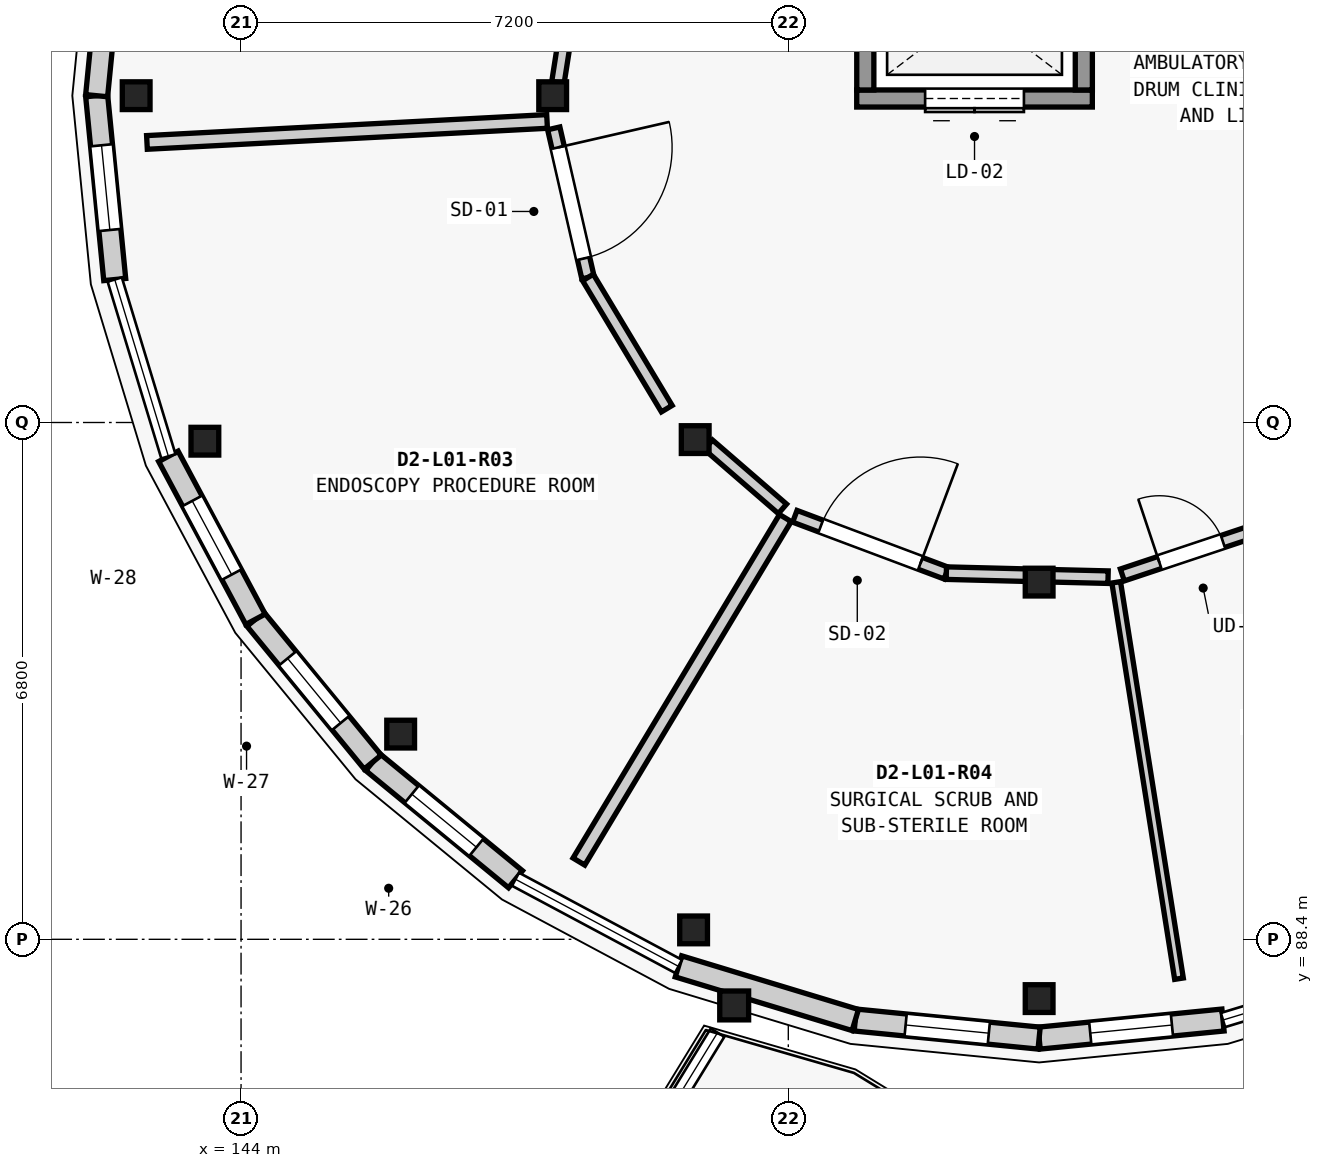
"""IFC4 building model, lengths in metres.
Left out: names, types, materials, properties, quantities, classifications, styles, units other than length and angle.
Written with IfcOpenShell. Run it as: python <this file> out.ifc"""

import sys

from ifc_helpers import new_model, si_unit, direction, frame, frame_2d, origin, origin_2d, place, context, subcontext, project, spatial, rectangle, circle, extrude, element, fill, save


model = new_model("IFC4")
c1 = context("Model", 3, precision=1e-05, world=origin(), true_north=direction((0.0, 1.0)))
c2 = subcontext(c1, "Body", "Model", "MODEL_VIEW")
j1 = project(units=[si_unit("LENGTHUNIT", "METRE"), si_unit("PLANEANGLEUNIT", "RADIAN")], contexts=[c1])
p1 = place(None, origin())
s1 = spatial("IfcSite", under=j1, at=p1, CompositionType="ELEMENT")
p2 = place(p1, origin())
s2 = spatial("IfcBuilding", under=s1, at=p2, CompositionType="ELEMENT")
p3 = place(p2, frame((0.0, 0.0, 4.55)))
s3 = spatial("IfcBuildingStorey", under=s2, at=p3, CompositionType="ELEMENT", Elevation=4.55)
for number, where, z_axis, x_axis in (
    (1, (142.62, 99.5, 0.0), (0.0, 0.0, 1.0), (1.0, 0.0, 0.0)),
    (2, (143.524, 94.954, 0.0), (0.0, 0.0, 1.0), (1.0, 0.0, 0.0)),
    (3, (146.1, 91.1, 0.0), (0.0, 0.0, 1.0), (1.0, 0.0, 0.0)),
    (4, (149.954, 88.524, 0.0), (0.0, 0.0, 1.0), (1.0, 0.0, 0.0)),
    (5, (154.5, 87.62, 0.0), (0.0, 0.0, 1.0), (1.0, 0.0, 0.0)),
    (6, (148.1, 99.5, 0.0), (0.0, 0.0, 1.0), (1.0, 0.0, 0.0)),
    (7, (149.975, 94.975, 0.0), (0.0, 0.0, 1.0), (1.0, 0.0, 0.0)),
    (8, (154.5, 93.1, 0.0), (0.0, 0.0, 1.0), (1.0, 0.0, 0.0)),
):
    element("IfcColumn", number, at=place(p3, frame(where, z_axis=z_axis, x_axis=x_axis)), inside=s3, PredefinedType="COLUMN", context=c2, shape_type="SweptSolid", body=[
        extrude(rectangle(XDim=0.365, YDim=0.365, at=origin_2d()), origin(), (0.0, 0.0, 1.0), 4.2),
    ])
p4 = place(p3, frame((150.488, 87.53, 0.0), z_axis=(0.0, 0.0, 1.0), x_axis=(1.0, 0.0, 0.0)))
e9 = element("IfcColumn", 9, at=p4, inside=s3, PredefinedType="PILASTER", context=c2, shape_type="SweptSolid", body=[
    extrude(circle(Radius=0.19, at=origin_2d()), origin(), (0.0, 0.0, 1.0), 4.2),
])
p5 = place(p3, frame((156.919, 87.338, 0.0), z_axis=(0.0, 0.0, 1.0), x_axis=(-0.995202863323, -0.097832820839, 0.0)))
e10 = element("IfcWall", 10, at=p5, inside=s3, PredefinedType="ELEMENTEDWALL", context=c2, shape_type="SweptSolid", body=[
    extrude(rectangle(XDim=2.431, YDim=0.29, at=frame_2d((1.215, 0.0))), origin(), (0.0, 0.0, 1.0), 3.309),
])
p6 = place(p5, frame((0.675, 0.0, 0.85)))
e11 = element("IfcOpeningElement", 11, at=p6, cuts=e10, PredefinedType="OPENING", context=c2, shape_type="SweptSolid", body=[
    extrude(rectangle(XDim=1.08, YDim=1.8, at=frame_2d((0.54, 0.9))), frame((0.0, 0.155, 0.0), z_axis=(0.0, -1.0, 0.0), x_axis=(1.0, 0.0, 0.0)), (0.0, 0.0, 1.0), 0.31),
])
p7 = place(p3, frame((154.5, 87.1, 0.0), z_axis=(0.0, 0.0, 1.0), x_axis=(-0.995202863323, 0.097832820839, 0.0)))
e12 = element("IfcWall", 12, at=p7, inside=s3, PredefinedType="ELEMENTEDWALL", context=c2, shape_type="SweptSolid", body=[
    extrude(rectangle(XDim=2.431, YDim=0.29, at=frame_2d((1.215, 0.0))), origin(), (0.0, 0.0, 1.0), 3.309),
])
p8 = place(p7, frame((0.665, 0.0, 0.85)))
e13 = element("IfcOpeningElement", 13, at=p8, cuts=e12, PredefinedType="OPENING", context=c2, shape_type="SweptSolid", body=[
    extrude(rectangle(XDim=1.1, YDim=1.25, at=frame_2d((0.55, 0.625))), frame((0.0, 0.155, 0.0), z_axis=(0.0, -1.0, 0.0), x_axis=(1.0, 0.0, 0.0)), (0.0, 0.0, 1.0), 0.31),
])
p9 = place(p3, frame((152.081, 87.338, 0.0), z_axis=(0.0, 0.0, 1.0), x_axis=(-0.956892539407, 0.290442193951, 0.0)))
e14 = element("IfcWall", 14, at=p9, inside=s3, PredefinedType="ELEMENTEDWALL", context=c2, shape_type="SweptSolid", body=[
    extrude(rectangle(XDim=2.431, YDim=0.29, at=frame_2d((1.215, 0.0))), origin(), (0.0, 0.0, 1.0), 3.309),
])
p10 = place(p3, frame((147.611, 89.19, 0.0), z_axis=(0.0, 0.0, 1.0), x_axis=(-0.773048113134, 0.634347392822, 0.0)))
e15 = element("IfcWall", 15, at=p10, inside=s3, PredefinedType="ELEMENTEDWALL", context=c2, shape_type="SweptSolid", body=[
    extrude(rectangle(XDim=2.431, YDim=0.29, at=frame_2d((1.215, 0.0))), origin(), (0.0, 0.0, 1.0), 3.309),
])
p11 = place(p10, frame((0.665, 0.0, 0.85)))
e16 = element("IfcOpeningElement", 16, at=p11, cuts=e15, PredefinedType="OPENING", context=c2, shape_type="SweptSolid", body=[
    extrude(rectangle(XDim=1.1, YDim=1.5, at=frame_2d((0.55, 0.75))), frame((0.0, 0.155, 0.0), z_axis=(0.0, -1.0, 0.0), x_axis=(1.0, 0.0, 0.0)), (0.0, 0.0, 1.0), 0.31),
])
p12 = place(p3, frame((145.732, 90.732, 0.0), z_axis=(0.0, 0.0, 1.0), x_axis=(-0.634347392822, 0.773048113134, 0.0)))
e17 = element("IfcWall", 17, at=p12, inside=s3, PredefinedType="ELEMENTEDWALL", context=c2, shape_type="SweptSolid", body=[
    extrude(rectangle(XDim=2.431, YDim=0.29, at=frame_2d((1.215, 0.0))), origin(), (0.0, 0.0, 1.0), 3.309),
])
p13 = place(p12, frame((0.665, 0.0, 0.85)))
e18 = element("IfcOpeningElement", 18, at=p13, cuts=e17, PredefinedType="OPENING", context=c2, shape_type="SweptSolid", body=[
    extrude(rectangle(XDim=1.1, YDim=1.85, at=frame_2d((0.55, 0.925))), frame((0.0, 0.155, 0.0), z_axis=(0.0, -1.0, 0.0), x_axis=(1.0, 0.0, 0.0)), (0.0, 0.0, 1.0), 0.31),
])
p14 = place(p3, frame((144.19, 92.611, 0.0), z_axis=(0.0, 0.0, 1.0), x_axis=(-0.471432490996, 0.881902152415, 0.0)))
e19 = element("IfcWall", 19, at=p14, inside=s3, PredefinedType="ELEMENTEDWALL", context=c2, shape_type="SweptSolid", body=[
    extrude(rectangle(XDim=2.431, YDim=0.29, at=frame_2d((1.215, 0.0))), origin(), (0.0, 0.0, 1.0), 3.309),
])
p15 = place(p14, frame((0.666, 0.0, 0.85)))
e20 = element("IfcOpeningElement", 20, at=p15, cuts=e19, PredefinedType="OPENING", context=c2, shape_type="SweptSolid", body=[
    extrude(rectangle(XDim=1.1, YDim=2.1, at=frame_2d((0.55, 1.05))), frame((0.0, 0.155, 0.0), z_axis=(0.0, -1.0, 0.0), x_axis=(1.0, 0.0, 0.0)), (0.0, 0.0, 1.0), 0.31),
])
p16 = place(p3, frame((142.338, 97.081, 0.0), z_axis=(0.0, 0.0, 1.0), x_axis=(-0.097832820839, 0.995202863323, 0.0)))
e21 = element("IfcWall", 21, at=p16, inside=s3, PredefinedType="ELEMENTEDWALL", context=c2, shape_type="SweptSolid", body=[
    extrude(rectangle(XDim=2.431, YDim=0.29, at=frame_2d((1.215, 0.0))), origin(), (0.0, 0.0, 1.0), 3.309),
])
p17 = place(p16, frame((0.655, 0.0, 0.85)))
e22 = element("IfcOpeningElement", 22, at=p17, cuts=e21, PredefinedType="OPENING", context=c2, shape_type="SweptSolid", body=[
    extrude(rectangle(XDim=1.12, YDim=1.65, at=frame_2d((0.56, 0.825))), frame((0.0, 0.155, 0.0), z_axis=(0.0, -1.0, 0.0), x_axis=(1.0, 0.0, 0.0)), (0.0, 0.0, 1.0), 0.31),
])
p18 = place(p3, frame((142.1, 99.5, 0.0), z_axis=(0.0, 0.0, 1.0), x_axis=(0.097832820839, 0.995202863323, 0.0)))
e23 = element("IfcWall", 23, at=p18, inside=s3, PredefinedType="ELEMENTEDWALL", context=c2, shape_type="SweptSolid", body=[
    extrude(rectangle(XDim=2.431, YDim=0.29, at=frame_2d((1.215, 0.0))), origin(), (0.0, 0.0, 1.0), 3.309),
])
p19 = place(p18, frame((0.64, 0.0, 0.85)))
e24 = element("IfcOpeningElement", 24, at=p19, cuts=e23, PredefinedType="OPENING", context=c2, shape_type="SweptSolid", body=[
    extrude(rectangle(XDim=1.15, YDim=1.4, at=frame_2d((0.575, 0.7))), frame((0.0, 0.155, 0.0), z_axis=(0.0, -1.0, 0.0), x_axis=(1.0, 0.0, 0.0)), (0.0, 0.0, 1.0), 0.31),
])
p20 = place(p3, frame((152.1, 99.463, 0.0), z_axis=(0.0, 0.0, 1.0), x_axis=(1.0, 0.0, 0.0)))
e25 = element("IfcWall", 25, at=p20, inside=s3, PredefinedType="SHEAR", context=c2, shape_type="SweptSolid", body=[
    extrude(rectangle(XDim=3.1, YDim=0.225, at=frame_2d((1.55, 0.0))), origin(), (0.0, 0.0, 1.0), 3.955),
])
p21 = place(p20, frame((0.9, 0.0, 0.0)))
e26 = element("IfcOpeningElement", 26, at=p21, cuts=e25, PredefinedType="OPENING", context=c2, shape_type="SweptSolid", body=[
    extrude(rectangle(XDim=1.3, YDim=2.2, at=frame_2d((0.65, 1.1))), frame((0.0, 0.123, 0.0), z_axis=(0.0, -1.0, 0.0), x_axis=(1.0, 0.0, 0.0)), (0.0, 0.0, 1.0), 0.245),
])
for number, where, z_axis, x_axis in (
    (27, (152.213, 99.575, 0.0), (0.0, 0.0, 1.0), (0.0, 1.0, 0.0)),
    (28, (155.088, 99.575, 0.0), (0.0, 0.0, 1.0), (0.0, 1.0, 0.0)),
):
    element("IfcWall", number, at=place(p3, frame(where, z_axis=z_axis, x_axis=x_axis)), inside=s3, PredefinedType="SHEAR", context=c2, shape_type="SweptSolid", body=[
        extrude(rectangle(XDim=2.15, YDim=0.225, at=frame_2d((1.075, 0.0))), origin(), (0.0, 0.0, 1.0), 3.955),
    ])
p22 = place(p3, frame((148.026, 99.161, 0.0), z_axis=(0.0, 0.0, 1.0), x_axis=(-0.998629447921, -0.052337613105, 0.0)))
e29 = element("IfcWall", 29, at=p22, inside=s3, PredefinedType="PARTITIONING", context=c2, shape_type="SweptSolid", body=[
    extrude(rectangle(XDim=5.271, YDim=0.18, at=frame_2d((2.636, 0.0))), origin(), (0.0, 0.0, 1.0), 3.284),
])
p23 = place(p3, frame((151.161, 93.943, 0.0), z_axis=(0.0, 0.0, 1.0), x_axis=(-0.515026730069, -0.857174117268, 0.0)))
e30 = element("IfcWall", 30, at=p23, inside=s3, PredefinedType="PARTITIONING", context=c2, shape_type="SweptSolid", body=[
    extrude(rectangle(XDim=5.273, YDim=0.18, at=frame_2d((2.637, 0.0))), origin(), (0.0, 0.0, 1.0), 3.284),
])
p24 = place(p3, frame((155.514, 93.097, 0.0), z_axis=(0.0, 0.0, 1.0), x_axis=(0.156475439167, -0.98768185006, 0.0)))
e31 = element("IfcWall", 31, at=p24, inside=s3, PredefinedType="PARTITIONING", context=c2, shape_type="SweptSolid", body=[
    extrude(rectangle(XDim=5.28, YDim=0.115, at=frame_2d((2.64, 0.0))), origin(), (0.0, 0.0, 1.0), 3.284),
])
p25 = place(p3, frame((148.484, 101.684, 0.0), z_axis=(0.0, 0.0, 1.0), x_axis=(-0.154797832722, -0.98794616806, 0.0)))
e32 = element("IfcWall", 32, at=p25, inside=s3, PredefinedType="PARTITIONING", context=c2, shape_type="SweptSolid", body=[
    extrude(rectangle(XDim=2.034, YDim=0.165, at=frame_2d((1.017, 0.0))), origin(), (0.0, 0.0, 1.0), 3.284),
])
p26 = place(p3, frame((148.114, 99.07, 0.0), z_axis=(0.0, 0.0, 1.0), x_axis=(0.223512984269, -0.974700952017, 0.0)))
e33 = element("IfcWall", 33, at=p26, inside=s3, PredefinedType="PARTITIONING", context=c2, shape_type="SweptSolid", body=[
    extrude(rectangle(XDim=2.013, YDim=0.165, at=frame_2d((1.007, 0.0))), origin(), (0.0, 0.0, 1.0), 3.284),
])
p27 = place(p26, frame((0.257, 0.0, 0.0)))
e34 = element("IfcOpeningElement", 34, at=p27, cuts=e33, PredefinedType="OPENING", context=c2, shape_type="SweptSolid", body=[
    extrude(rectangle(XDim=1.5, YDim=2.3, at=frame_2d((0.75, 1.15))), frame((0.0, 0.093, 0.0), z_axis=(0.0, -1.0, 0.0), x_axis=(1.0, 0.0, 0.0)), (0.0, 0.0, 1.0), 0.185),
])
p28 = place(p3, frame((148.564, 97.108, 0.0), z_axis=(0.0, 0.0, 1.0), x_axis=(0.515084069478, -0.857139662698, 0.0)))
e35 = element("IfcWall", 35, at=p28, inside=s3, PredefinedType="PARTITIONING", context=c2, shape_type="SweptSolid", body=[
    extrude(rectangle(XDim=2.013, YDim=0.165, at=frame_2d((1.007, 0.0))), origin(), (0.0, 0.0, 1.0), 3.284),
])
p29 = place(p3, frame((150.149, 94.907, 0.0), z_axis=(0.0, 0.0, 1.0), x_axis=(0.756157862191, -0.654389247655, 0.0)))
e36 = element("IfcWall", 36, at=p29, inside=s3, PredefinedType="PARTITIONING", context=c2, shape_type="SweptSolid", body=[
    extrude(rectangle(XDim=1.288, YDim=0.165, at=frame_2d((0.644, 0.0))), origin(), (0.0, 0.0, 1.0), 3.284),
])
p30 = place(p3, frame((151.286, 93.966, 0.0), z_axis=(0.0, 0.0, 1.0), x_axis=(0.93623488757, -0.35137477897, 0.0)))
e37 = element("IfcWall", 37, at=p30, inside=s3, PredefinedType="PARTITIONING", context=c2, shape_type="SweptSolid", body=[
    extrude(rectangle(XDim=2.129, YDim=0.165, at=frame_2d((1.064, 0.0))), origin(), (0.0, 0.0, 1.0), 3.284),
])
p31 = place(p30, frame((0.365, 0.0, 0.0)))
e38 = element("IfcOpeningElement", 38, at=p31, cuts=e37, PredefinedType="OPENING", context=c2, shape_type="SweptSolid", body=[
    extrude(rectangle(XDim=1.4, YDim=2.25, at=frame_2d((0.7, 1.125))), frame((0.0, 0.093, 0.0), z_axis=(0.0, -1.0, 0.0), x_axis=(1.0, 0.0, 0.0)), (0.0, 0.0, 1.0), 0.185),
])
p32 = place(p3, frame((153.279, 93.218, 0.0), z_axis=(0.0, 0.0, 1.0), x_axis=(0.999671430909, -0.025632600793, 0.0)))
e39 = element("IfcWall", 39, at=p32, inside=s3, PredefinedType="PARTITIONING", context=c2, shape_type="SweptSolid", body=[
    extrude(rectangle(XDim=1.057, YDim=0.165, at=frame_2d((0.529, 0.0))), origin(), (0.0, 0.0, 1.0), 3.284),
])
p33 = place(p3, frame((154.668, 93.183, 0.0), z_axis=(0.0, 0.0, 1.0), x_axis=(0.999701314602, -0.024439344989, 0.0)))
e40 = element("IfcWall", 40, at=p33, inside=s3, PredefinedType="PARTITIONING", context=c2, shape_type="SweptSolid", body=[
    extrude(rectangle(XDim=0.739, YDim=0.165, at=frame_2d((0.37, 0.0))), origin(), (0.0, 0.0, 1.0), 3.284),
])
p34 = place(p3, frame((155.595, 93.194, 0.0), z_axis=(0.0, 0.0, 1.0), x_axis=(0.948632132652, 0.316381220839, 0.0)))
e41 = element("IfcWall", 41, at=p34, inside=s3, PredefinedType="PARTITIONING", context=c2, shape_type="SweptSolid", body=[
    extrude(rectangle(XDim=1.909, YDim=0.165, at=frame_2d((0.955, 0.0))), origin(), (0.0, 0.0, 1.0), 3.284),
])
p35 = place(p34, frame((0.514, 0.0, 0.0)))
e42 = element("IfcOpeningElement", 42, at=p35, cuts=e41, PredefinedType="OPENING", context=c2, shape_type="SweptSolid", body=[
    extrude(rectangle(XDim=0.88, YDim=2.1, at=frame_2d((0.44, 1.05))), frame((0.0, 0.093, 0.0), z_axis=(0.0, -1.0, 0.0), x_axis=(1.0, 0.0, 0.0)), (0.0, 0.0, 1.0), 0.185),
])
p36 = place(p6, origin())
e43 = element("IfcWindow", 43, at=p36, inside=s3, PartitioningType="SINGLE_PANEL", PredefinedType="WINDOW", context=c2, shape_type="SweptSolid", body=[
    extrude(rectangle(XDim=1.08, YDim=1.8, at=frame_2d((0.54, 0.9))), frame((0.0, 0.03, 0.0), z_axis=(0.0, -1.0, 0.0), x_axis=(1.0, 0.0, 0.0)), (0.0, 0.0, 1.0), 0.06),
])
fill(e11, e43)
p37 = place(p8, origin())
e44 = element("IfcWindow", 44, at=p37, inside=s3, PartitioningType="SINGLE_PANEL", PredefinedType="WINDOW", context=c2, shape_type="SweptSolid", body=[
    extrude(rectangle(XDim=1.1, YDim=1.25, at=frame_2d((0.55, 0.625))), frame((0.0, 0.03, 0.0), z_axis=(0.0, -1.0, 0.0), x_axis=(1.0, 0.0, 0.0)), (0.0, 0.0, 1.0), 0.06),
])
fill(e13, e44)
p38 = place(p11, origin())
e45 = element("IfcWindow", 45, at=p38, inside=s3, PartitioningType="SINGLE_PANEL", PredefinedType="WINDOW", context=c2, shape_type="SweptSolid", body=[
    extrude(rectangle(XDim=1.1, YDim=1.5, at=frame_2d((0.55, 0.75))), frame((0.0, 0.03, 0.0), z_axis=(0.0, -1.0, 0.0), x_axis=(1.0, 0.0, 0.0)), (0.0, 0.0, 1.0), 0.06),
])
fill(e16, e45)
p39 = place(p13, origin())
e46 = element("IfcWindow", 46, at=p39, inside=s3, PartitioningType="SINGLE_PANEL", PredefinedType="WINDOW", context=c2, shape_type="SweptSolid", body=[
    extrude(rectangle(XDim=1.1, YDim=1.85, at=frame_2d((0.55, 0.925))), frame((0.0, 0.03, 0.0), z_axis=(0.0, -1.0, 0.0), x_axis=(1.0, 0.0, 0.0)), (0.0, 0.0, 1.0), 0.06),
])
fill(e18, e46)
p40 = place(p15, origin())
e47 = element("IfcWindow", 47, at=p40, inside=s3, PartitioningType="SINGLE_PANEL", PredefinedType="WINDOW", context=c2, shape_type="SweptSolid", body=[
    extrude(rectangle(XDim=1.1, YDim=2.1, at=frame_2d((0.55, 1.05))), frame((0.0, 0.03, 0.0), z_axis=(0.0, -1.0, 0.0), x_axis=(1.0, 0.0, 0.0)), (0.0, 0.0, 1.0), 0.06),
])
fill(e20, e47)
p41 = place(p17, origin())
e48 = element("IfcWindow", 48, at=p41, inside=s3, PartitioningType="SINGLE_PANEL", PredefinedType="WINDOW", context=c2, shape_type="SweptSolid", body=[
    extrude(rectangle(XDim=1.12, YDim=1.65, at=frame_2d((0.56, 0.825))), frame((0.0, 0.03, 0.0), z_axis=(0.0, -1.0, 0.0), x_axis=(1.0, 0.0, 0.0)), (0.0, 0.0, 1.0), 0.06),
])
fill(e22, e48)
p42 = place(p21, origin())
e49 = element("IfcDoor", 49, at=p42, inside=s3, OperationType="DOUBLE_DOOR_SLIDING", PredefinedType="DOOR", context=c2, shape_type="SweptSolid", body=[
    extrude(rectangle(XDim=1.3, YDim=2.2, at=frame_2d((0.65, 1.1))), frame((0.0, 0.025, 0.0), z_axis=(0.0, -1.0, 0.0), x_axis=(1.0, 0.0, 0.0)), (0.0, 0.0, 1.0), 0.05),
])
fill(e26, e49)
p43 = place(p27, origin())
e50 = element("IfcDoor", 50, at=p43, inside=s3, OperationType="SINGLE_SWING_LEFT", PredefinedType="DOOR", context=c2, shape_type="SweptSolid", body=[
    extrude(rectangle(XDim=1.5, YDim=2.3, at=frame_2d((0.75, 1.15))), frame((0.0, 0.025, 0.0), z_axis=(0.0, -1.0, 0.0), x_axis=(1.0, 0.0, 0.0)), (0.0, 0.0, 1.0), 0.05),
])
fill(e34, e50)
p44 = place(p31, origin())
e51 = element("IfcDoor", 51, at=p44, inside=s3, OperationType="SINGLE_SWING_RIGHT", PredefinedType="DOOR", context=c2, shape_type="SweptSolid", body=[
    extrude(rectangle(XDim=1.4, YDim=2.25, at=frame_2d((0.7, 1.125))), frame((0.0, 0.025, 0.0), z_axis=(0.0, -1.0, 0.0), x_axis=(1.0, 0.0, 0.0)), (0.0, 0.0, 1.0), 0.05),
])
fill(e38, e51)
p45 = place(p35, origin())
e52 = element("IfcDoor", 52, at=p45, inside=s3, OperationType="SINGLE_SWING_LEFT", PredefinedType="DOOR", context=c2, shape_type="SweptSolid", body=[
    extrude(rectangle(XDim=0.88, YDim=2.1, at=frame_2d((0.44, 1.05))), frame((0.0, 0.025, 0.0), z_axis=(0.0, -1.0, 0.0), x_axis=(1.0, 0.0, 0.0)), (0.0, 0.0, 1.0), 0.05),
])
fill(e42, e52)
save(model, sys.argv[1])
